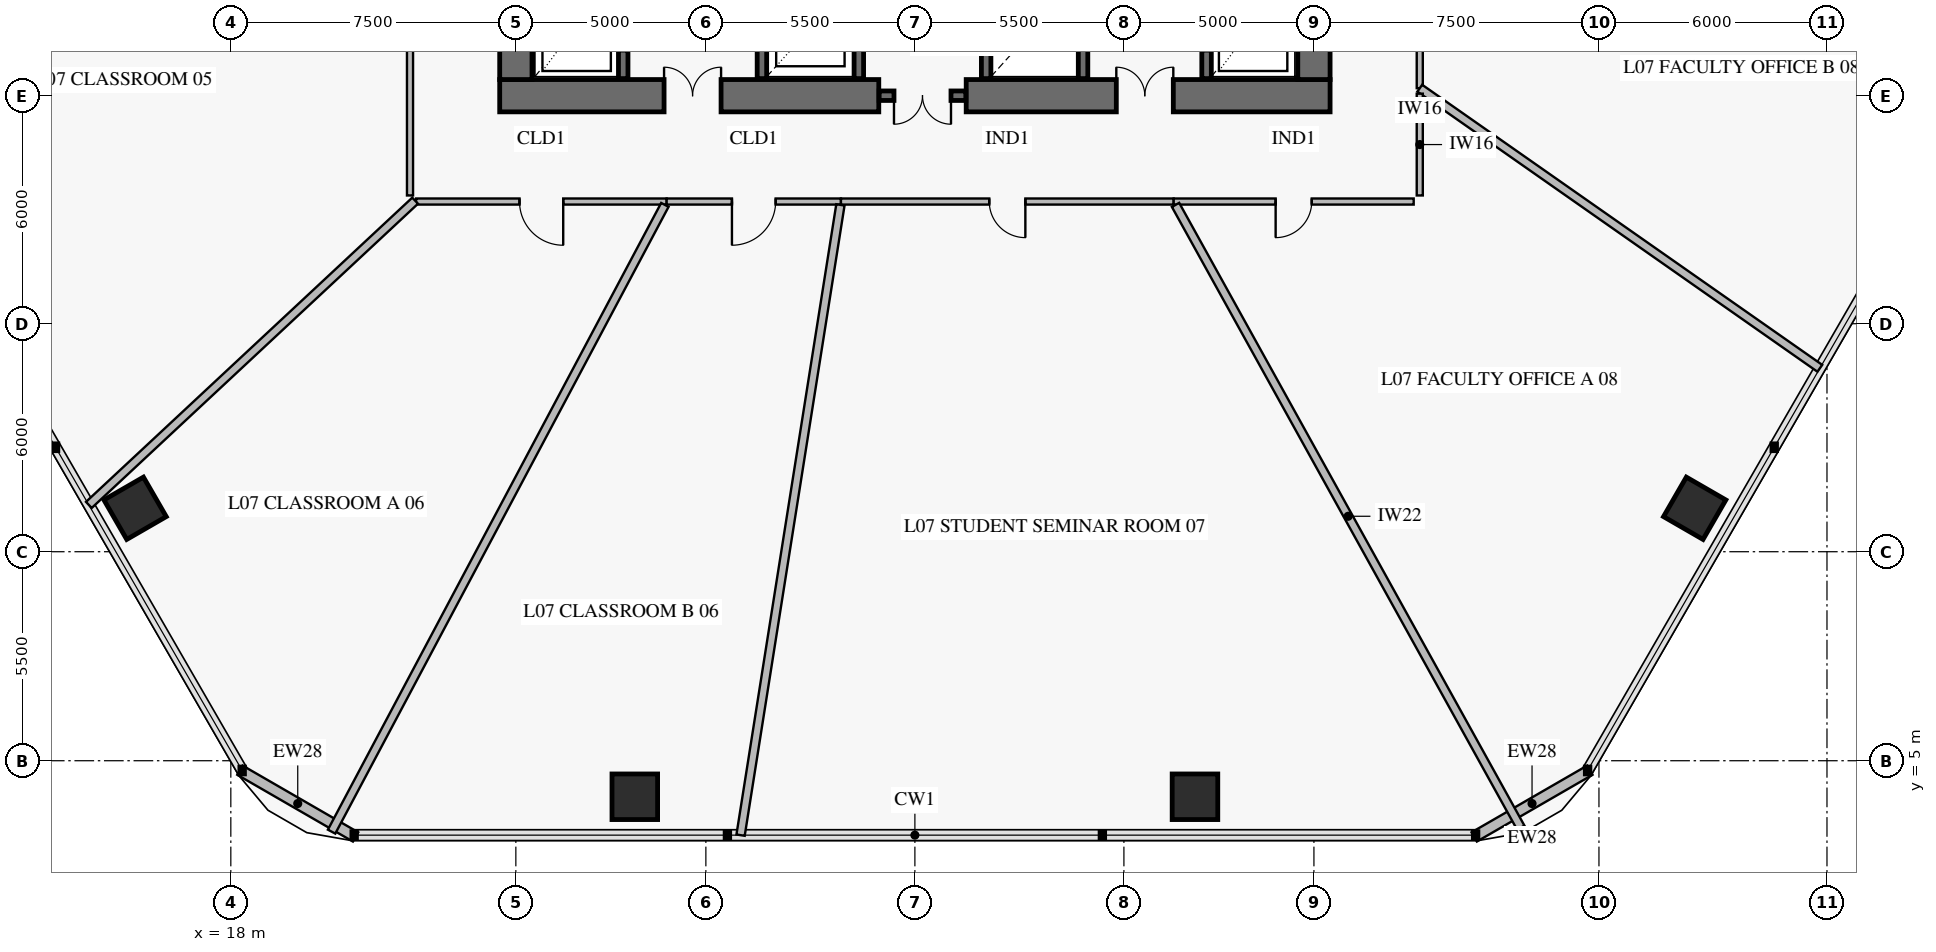
"""IFC4 building model, lengths in metres.
Left out: names, types, materials, properties, quantities, classifications, styles, units other than length and angle.
Written with IfcOpenShell. Run it as: python <this file> out.ifc"""

import sys

from ifc_helpers import new_model, si_unit, direction, frame, frame_2d, origin, origin_2d, place, context, subcontext, project, spatial, rectangle, extrude, element, fill, save


model = new_model("IFC4")
c1 = context("Model", 3, precision=1e-05, world=origin(), true_north=direction((0.0, 1.0)))
c2 = subcontext(c1, "Body", "Model", "MODEL_VIEW")
j1 = project(units=[si_unit("LENGTHUNIT", "METRE"), si_unit("PLANEANGLEUNIT", "RADIAN")], contexts=[c1])
p1 = place(None, origin())
s1 = spatial("IfcSite", under=j1, at=p1, CompositionType="ELEMENT")
p2 = place(p1, origin())
s2 = spatial("IfcBuilding", under=s1, at=p2, CompositionType="ELEMENT")
p3 = place(p2, frame((0.0, 0.0, 28.8)))
s3 = spatial("IfcBuildingStorey", under=s2, at=p3, CompositionType="ELEMENT", Elevation=28.8)
p4 = place(p3, frame((25.075, 22.5, 0.0), z_axis=(0.0, 0.0, 1.0), x_axis=(1.0, 0.0, 0.0)))
e1 = element("IfcWall", 1, at=p4, inside=s3, PredefinedType="SHEAR", context=c2, shape_type="SweptSolid", body=[
    extrude(rectangle(XDim=9.975, YDim=0.85, at=frame_2d((4.988, 0.0))), origin(), (0.0, 0.0, 1.0), 4.2),
])
p5 = place(p4, frame((4.325, 0.0, 0.0)))
e2 = element("IfcOpeningElement", 2, at=p5, cuts=e1, PredefinedType="OPENING", context=c2, shape_type="SweptSolid", body=[
    extrude(rectangle(XDim=1.5, YDim=2.15, at=frame_2d((0.75, 1.075))), frame((0.0, 0.437, 0.0), z_axis=(0.0, -1.0, 0.0), x_axis=(1.0, 0.0, 0.0)), (0.0, 0.0, 1.0), 0.874),
])
p6 = place(p3, frame((37.35, 22.5, 0.0), z_axis=(0.0, 0.0, 1.0), x_axis=(1.0, 0.0, 0.0)))
e3 = element("IfcWall", 3, at=p6, inside=s3, PredefinedType="SHEAR", context=c2, shape_type="SweptSolid", body=[
    extrude(rectangle(XDim=9.575, YDim=0.85, at=frame_2d((4.788, 0.0))), origin(), (0.0, 0.0, 1.0), 4.2),
])
p7 = place(p6, frame((3.95, 0.0, 0.0)))
e4 = element("IfcOpeningElement", 4, at=p7, cuts=e3, PredefinedType="OPENING", context=c2, shape_type="SweptSolid", body=[
    extrude(rectangle(XDim=1.5, YDim=2.15, at=frame_2d((0.75, 1.075))), frame((0.0, 0.437, 0.0), z_axis=(0.0, -1.0, 0.0), x_axis=(1.0, 0.0, 0.0)), (0.0, 0.0, 1.0), 0.874),
])
p8 = place(p3, frame((25.5, 22.925, 0.0), z_axis=(0.0, 0.0, 1.0), x_axis=(0.0, 1.0, 0.0)))
e5 = element("IfcWall", 5, at=p8, inside=s3, PredefinedType="SHEAR", context=c2, shape_type="SweptSolid", body=[
    extrude(rectangle(XDim=18.15, YDim=0.85, at=frame_2d((9.075, 0.0))), origin(), (0.0, 0.0, 1.0), 4.2),
])
p9 = place(p8, frame((8.825, 0.0, 0.0)))
e6 = element("IfcOpeningElement", 6, at=p9, cuts=e5, PredefinedType="OPENING", context=c2, shape_type="SweptSolid", body=[
    extrude(rectangle(XDim=1.1, YDim=2.15, at=frame_2d((0.55, 1.075))), frame((0.0, 0.437, 0.0), z_axis=(0.0, -1.0, 0.0), x_axis=(1.0, 0.0, 0.0)), (0.0, 0.0, 1.0), 0.874),
])
p10 = place(p3, frame((46.5, 22.925, 0.0), z_axis=(0.0, 0.0, 1.0), x_axis=(0.0, 1.0, 0.0)))
e7 = element("IfcWall", 7, at=p10, inside=s3, PredefinedType="SHEAR", context=c2, shape_type="SweptSolid", body=[
    extrude(rectangle(XDim=18.15, YDim=0.85, at=frame_2d((9.075, 0.0))), origin(), (0.0, 0.0, 1.0), 4.2),
])
p11 = place(p10, frame((8.825, 0.0, 0.0)))
e8 = element("IfcOpeningElement", 8, at=p11, cuts=e7, PredefinedType="OPENING", context=c2, shape_type="SweptSolid", body=[
    extrude(rectangle(XDim=1.1, YDim=2.15, at=frame_2d((0.55, 1.075))), frame((0.0, 0.437, 0.0), z_axis=(0.0, -1.0, 0.0), x_axis=(1.0, 0.0, 0.0)), (0.0, 0.0, 1.0), 0.874),
])
for number, where, z_axis, x_axis in (
    (9, (15.481, 11.643, 0.0), (0.0, 0.0, 1.0), (0.5, -0.866, 0.0)),
    (10, (28.63, 4.052, 0.0), (0.0, 0.0, 1.0), (1.0, 0.0, 0.0)),
    (11, (43.37, 4.052, 0.0), (0.0, 0.0, 1.0), (1.0, 0.0, 0.0)),
    (12, (56.519, 11.643, 0.0), (0.0, 0.0, 1.0), (0.5, 0.866, 0.0)),
):
    element("IfcColumn", number, at=place(p3, frame(where, z_axis=z_axis, x_axis=x_axis)), inside=s3, PredefinedType="COLUMN", context=c2, shape_type="SweptSolid", body=[
        extrude(rectangle(XDim=1.2, YDim=1.2, at=origin_2d()), origin(), (0.0, 0.0, 1.0), 3.92),
    ])
for number, where, z_axis, x_axis in (
    (13, (53.761, 4.751, 0.0), (0.0, 0.0, 1.0), (-0.866, -0.5, 0.0)),
    (14, (21.283, 2.994, 0.0), (0.0, 0.0, 1.0), (-0.866, 0.5, 0.0)),
):
    element("IfcWall", number, at=place(p3, frame(where, z_axis=z_axis, x_axis=x_axis)), inside=s3, PredefinedType="SOLIDWALL", context=c2, shape_type="SweptSolid", body=[
        extrude(rectangle(XDim=3.515, YDim=0.28, at=frame_2d((1.757, 0.0))), origin(), (0.0, 0.0, 1.0), 3.92),
    ])
p12 = place(p3, frame((35.06, 22.5, 0.0), z_axis=(0.0, 0.0, 1.0), x_axis=(1.0, 0.0, 0.0)))
e15 = element("IfcWall", 15, at=p12, inside=s3, PredefinedType="SOLIDWALL", context=c2, shape_type="SweptSolid", body=[
    extrude(rectangle(XDim=2.28, YDim=0.25, at=frame_2d((1.14, 0.0))), origin(), (0.0, 0.0, 1.0), 4.2),
])
p13 = place(p12, frame((0.39, 0.0, 0.0)))
e16 = element("IfcOpeningElement", 16, at=p13, cuts=e15, PredefinedType="OPENING", context=c2, shape_type="SweptSolid", body=[
    extrude(rectangle(XDim=1.5, YDim=2.15, at=frame_2d((0.75, 1.075))), frame((0.0, 0.137, 0.0), z_axis=(0.0, -1.0, 0.0), x_axis=(1.0, 0.0, 0.0)), (0.0, 0.0, 1.0), 0.274),
])
p14 = place(p3, frame((28.325, 22.95, 0.0), z_axis=(0.0, 0.0, 1.0), x_axis=(0.0, 1.0, 0.0)))
e17 = element("IfcWall", 17, at=p14, inside=s3, PredefinedType="SOLIDWALL", context=c2, shape_type="SweptSolid", body=[
    extrude(rectangle(XDim=8.2, YDim=0.25, at=frame_2d((4.1, 0.0))), origin(), (0.0, 0.0, 1.0), 4.2),
])
p15 = place(p14, frame((0.75, 0.0, 0.0)))
e18 = element("IfcOpeningElement", 18, at=p15, cuts=e17, PredefinedType="OPENING", context=c2, shape_type="SweptSolid", body=[
    extrude(rectangle(XDim=1.3, YDim=2.3, at=frame_2d((0.65, 1.15))), frame((0.0, 0.137, 0.0), z_axis=(0.0, -1.0, 0.0), x_axis=(1.0, 0.0, 0.0)), (0.0, 0.0, 1.0), 0.274),
])
p16 = place(p14, frame((3.78, 0.0, 0.0)))
e19 = element("IfcOpeningElement", 19, at=p16, cuts=e17, PredefinedType="OPENING", context=c2, shape_type="SweptSolid", body=[
    extrude(rectangle(XDim=0.9, YDim=2.1, at=frame_2d((0.45, 1.05))), frame((0.0, 0.137, 0.0), z_axis=(0.0, -1.0, 0.0), x_axis=(1.0, 0.0, 0.0)), (0.0, 0.0, 1.0), 0.274),
])
p17 = place(p14, frame((6.5, 0.0, 0.0)))
e20 = element("IfcOpeningElement", 20, at=p17, cuts=e17, PredefinedType="OPENING", context=c2, shape_type="SweptSolid", body=[
    extrude(rectangle(XDim=0.9, YDim=2.1, at=frame_2d((0.45, 1.05))), frame((0.0, 0.137, 0.0), z_axis=(0.0, -1.0, 0.0), x_axis=(1.0, 0.0, 0.0)), (0.0, 0.0, 1.0), 0.274),
])
p18 = place(p3, frame((31.975, 22.95, 0.0), z_axis=(0.0, 0.0, 1.0), x_axis=(0.0, 1.0, 0.0)))
e21 = element("IfcWall", 21, at=p18, inside=s3, PredefinedType="SOLIDWALL", context=c2, shape_type="SweptSolid", body=[
    extrude(rectangle(XDim=8.2, YDim=0.25, at=frame_2d((4.1, 0.0))), origin(), (0.0, 0.0, 1.0), 4.2),
])
p19 = place(p3, frame((34.525, 22.95, 0.0), z_axis=(0.0, 0.0, 1.0), x_axis=(0.0, 1.0, 0.0)))
e22 = element("IfcWall", 22, at=p19, inside=s3, PredefinedType="SOLIDWALL", context=c2, shape_type="SweptSolid", body=[
    extrude(rectangle(XDim=8.2, YDim=0.25, at=frame_2d((4.1, 0.0))), origin(), (0.0, 0.0, 1.0), 4.2),
])
p20 = place(p19, frame((0.775, 0.0, 0.0)))
e23 = element("IfcOpeningElement", 23, at=p20, cuts=e22, PredefinedType="OPENING", context=c2, shape_type="SweptSolid", body=[
    extrude(rectangle(XDim=1.1, YDim=2.2, at=frame_2d((0.55, 1.1))), frame((0.0, 0.137, 0.0), z_axis=(0.0, -1.0, 0.0), x_axis=(1.0, 0.0, 0.0)), (0.0, 0.0, 1.0), 0.274),
])
p21 = place(p19, frame((3.575, 0.0, 0.0)))
e24 = element("IfcOpeningElement", 24, at=p21, cuts=e22, PredefinedType="OPENING", context=c2, shape_type="SweptSolid", body=[
    extrude(rectangle(XDim=1.1, YDim=2.2, at=frame_2d((0.55, 1.1))), frame((0.0, 0.137, 0.0), z_axis=(0.0, -1.0, 0.0), x_axis=(1.0, 0.0, 0.0)), (0.0, 0.0, 1.0), 0.274),
])
p22 = place(p19, frame((6.375, 0.0, 0.0)))
e25 = element("IfcOpeningElement", 25, at=p22, cuts=e22, PredefinedType="OPENING", context=c2, shape_type="SweptSolid", body=[
    extrude(rectangle(XDim=1.1, YDim=2.2, at=frame_2d((0.55, 1.1))), frame((0.0, 0.137, 0.0), z_axis=(0.0, -1.0, 0.0), x_axis=(1.0, 0.0, 0.0)), (0.0, 0.0, 1.0), 0.274),
])
for number, where, z_axis, x_axis in (
    (26, (37.875, 22.95, 0.0), (0.0, 0.0, 1.0), (0.0, 1.0, 0.0)),
    (27, (40.425, 22.95, 0.0), (0.0, 0.0, 1.0), (0.0, 1.0, 0.0)),
):
    element("IfcWall", number, at=place(p3, frame(where, z_axis=z_axis, x_axis=x_axis)), inside=s3, PredefinedType="SOLIDWALL", context=c2, shape_type="SweptSolid", body=[
        extrude(rectangle(XDim=8.2, YDim=0.25, at=frame_2d((4.1, 0.0))), origin(), (0.0, 0.0, 1.0), 4.2),
    ])
p23 = place(p3, frame((43.675, 22.95, 0.0), z_axis=(0.0, 0.0, 1.0), x_axis=(0.0, 1.0, 0.0)))
e28 = element("IfcWall", 28, at=p23, inside=s3, PredefinedType="SOLIDWALL", context=c2, shape_type="SweptSolid", body=[
    extrude(rectangle(XDim=8.2, YDim=0.25, at=frame_2d((4.1, 0.0))), origin(), (0.0, 0.0, 1.0), 4.2),
])
p24 = place(p23, frame((0.75, 0.0, 0.0)))
e29 = element("IfcOpeningElement", 29, at=p24, cuts=e28, PredefinedType="OPENING", context=c2, shape_type="SweptSolid", body=[
    extrude(rectangle(XDim=1.3, YDim=2.3, at=frame_2d((0.65, 1.15))), frame((0.0, 0.137, 0.0), z_axis=(0.0, -1.0, 0.0), x_axis=(1.0, 0.0, 0.0)), (0.0, 0.0, 1.0), 0.274),
])
p25 = place(p23, frame((3.7, 0.0, 0.0)))
e30 = element("IfcOpeningElement", 30, at=p25, cuts=e28, PredefinedType="OPENING", context=c2, shape_type="SweptSolid", body=[
    extrude(rectangle(XDim=1.3, YDim=2.3, at=frame_2d((0.65, 1.15))), frame((0.0, 0.137, 0.0), z_axis=(0.0, -1.0, 0.0), x_axis=(1.0, 0.0, 0.0)), (0.0, 0.0, 1.0), 0.274),
])
p26 = place(p23, frame((6.62, 0.0, 0.0)))
e31 = element("IfcOpeningElement", 31, at=p26, cuts=e28, PredefinedType="OPENING", context=c2, shape_type="SweptSolid", body=[
    extrude(rectangle(XDim=0.9, YDim=2.1, at=frame_2d((0.45, 1.05))), frame((0.0, 0.137, 0.0), z_axis=(0.0, -1.0, 0.0), x_axis=(1.0, 0.0, 0.0)), (0.0, 0.0, 1.0), 0.274),
])
p27 = place(p3, frame((22.715, 31.304, 0.0), z_axis=(0.0, 0.0, 1.0), x_axis=(0.0, -1.0, 0.0)))
e32 = element("IfcWall", 32, at=p27, inside=s3, PredefinedType="PARTITIONING", context=c2, shape_type="SweptSolid", body=[
    extrude(rectangle(XDim=11.429, YDim=0.16, at=frame_2d((5.714, 0.0))), origin(), (0.0, 0.0, 1.0), 3.22),
])
p28 = place(p27, frame((5.139, 0.0, 0.0)))
e33 = element("IfcOpeningElement", 33, at=p28, cuts=e32, PredefinedType="OPENING", context=c2, shape_type="SweptSolid", body=[
    extrude(rectangle(XDim=1.15, YDim=2.2, at=frame_2d((0.575, 1.1))), frame((0.0, 0.092, 0.0), z_axis=(0.0, -1.0, 0.0), x_axis=(1.0, 0.0, 0.0)), (0.0, 0.0, 1.0), 0.184),
])
p29 = place(p3, frame((22.875, 19.715, 0.0), z_axis=(0.0, 0.0, 1.0), x_axis=(1.0, 0.0, 0.0)))
e34 = element("IfcWall", 34, at=p29, inside=s3, PredefinedType="PARTITIONING", context=c2, shape_type="SweptSolid", body=[
    extrude(rectangle(XDim=6.593, YDim=0.16, at=frame_2d((3.296, 0.0))), origin(), (0.0, 0.0, 1.0), 3.22),
])
p30 = place(p29, frame((2.721, 0.0, 0.0)))
e35 = element("IfcOpeningElement", 35, at=p30, cuts=e34, PredefinedType="OPENING", context=c2, shape_type="SweptSolid", body=[
    extrude(rectangle(XDim=1.15, YDim=2.2, at=frame_2d((0.575, 1.1))), frame((0.0, 0.092, 0.0), z_axis=(0.0, -1.0, 0.0), x_axis=(1.0, 0.0, 0.0)), (0.0, 0.0, 1.0), 0.184),
])
p31 = place(p3, frame((29.468, 19.715, 0.0), z_axis=(0.0, 0.0, 1.0), x_axis=(1.0, 0.0, 0.0)))
e36 = element("IfcWall", 36, at=p31, inside=s3, PredefinedType="PARTITIONING", context=c2, shape_type="SweptSolid", body=[
    extrude(rectangle(XDim=4.586, YDim=0.16, at=frame_2d((2.293, 0.0))), origin(), (0.0, 0.0, 1.0), 3.22),
])
p32 = place(p31, frame((1.718, 0.0, 0.0)))
e37 = element("IfcOpeningElement", 37, at=p32, cuts=e36, PredefinedType="OPENING", context=c2, shape_type="SweptSolid", body=[
    extrude(rectangle(XDim=1.15, YDim=2.2, at=frame_2d((0.575, 1.1))), frame((0.0, 0.092, 0.0), z_axis=(0.0, -1.0, 0.0), x_axis=(1.0, 0.0, 0.0)), (0.0, 0.0, 1.0), 0.184),
])
p33 = place(p3, frame((34.054, 19.715, 0.0), z_axis=(0.0, 0.0, 1.0), x_axis=(1.0, 0.0, 0.0)))
e38 = element("IfcWall", 38, at=p33, inside=s3, PredefinedType="PARTITIONING", context=c2, shape_type="SweptSolid", body=[
    extrude(rectangle(XDim=8.756, YDim=0.16, at=frame_2d((4.378, 0.0))), origin(), (0.0, 0.0, 1.0), 3.22),
])
p34 = place(p33, frame((3.903, 0.0, 0.0)))
e39 = element("IfcOpeningElement", 39, at=p34, cuts=e38, PredefinedType="OPENING", context=c2, shape_type="SweptSolid", body=[
    extrude(rectangle(XDim=0.95, YDim=2.1, at=frame_2d((0.475, 1.05))), frame((0.0, 0.092, 0.0), z_axis=(0.0, -1.0, 0.0), x_axis=(1.0, 0.0, 0.0)), (0.0, 0.0, 1.0), 0.184),
])
p35 = place(p3, frame((42.81, 19.715, 0.0), z_axis=(0.0, 0.0, 1.0), x_axis=(1.0, 0.0, 0.0)))
e40 = element("IfcWall", 40, at=p35, inside=s3, PredefinedType="PARTITIONING", context=c2, shape_type="SweptSolid", body=[
    extrude(rectangle(XDim=6.315, YDim=0.16, at=frame_2d((3.158, 0.0))), origin(), (0.0, 0.0, 1.0), 3.22),
])
p36 = place(p35, frame((2.683, 0.0, 0.0)))
e41 = element("IfcOpeningElement", 41, at=p36, cuts=e40, PredefinedType="OPENING", context=c2, shape_type="SweptSolid", body=[
    extrude(rectangle(XDim=0.95, YDim=2.1, at=frame_2d((0.475, 1.05))), frame((0.0, 0.092, 0.0), z_axis=(0.0, -1.0, 0.0), x_axis=(1.0, 0.0, 0.0)), (0.0, 0.0, 1.0), 0.184),
])
p37 = place(p3, frame((49.285, 22.698, 0.0), z_axis=(0.0, 0.0, 1.0), x_axis=(0.0, 1.0, 0.0)))
e42 = element("IfcWall", 42, at=p37, inside=s3, PredefinedType="PARTITIONING", context=c2, shape_type="SweptSolid", body=[
    extrude(rectangle(XDim=7.198, YDim=0.16, at=frame_2d((3.599, 0.0))), origin(), (0.0, 0.0, 1.0), 3.22),
])
p38 = place(p37, frame((3.124, 0.0, 0.0)))
e43 = element("IfcOpeningElement", 43, at=p38, cuts=e42, PredefinedType="OPENING", context=c2, shape_type="SweptSolid", body=[
    extrude(rectangle(XDim=0.95, YDim=2.1, at=frame_2d((0.475, 1.05))), frame((0.0, 0.092, 0.0), z_axis=(0.0, -1.0, 0.0), x_axis=(1.0, 0.0, 0.0)), (0.0, 0.0, 1.0), 0.184),
])
p39 = place(p3, frame((22.85, 19.737, 0.0), z_axis=(0.0, 0.0, 1.0), x_axis=(-0.731360864489, -0.681990678744, 0.0)))
e44 = element("IfcWall", 44, at=p39, inside=s3, PredefinedType="PARTITIONING", context=c2, shape_type="SweptSolid", body=[
    extrude(rectangle(XDim=11.74, YDim=0.22, at=frame_2d((5.87, 0.0))), origin(), (0.0, 0.0, 1.0), 3.17),
])
p40 = place(p3, frame((29.421, 19.627, 0.0), z_axis=(0.0, 0.0, 1.0), x_axis=(-0.469469908408, -0.882948472505, 0.0)))
e45 = element("IfcWall", 45, at=p40, inside=s3, PredefinedType="PARTITIONING", context=c2, shape_type="SweptSolid", body=[
    extrude(rectangle(XDim=18.68, YDim=0.22, at=frame_2d((9.34, 0.0))), origin(), (0.0, 0.0, 1.0), 3.17),
])
p41 = place(p3, frame((34.04, 19.627, 0.0), z_axis=(0.0, 0.0, 1.0), x_axis=(-0.156438882107, -0.98768764099, 0.0)))
e46 = element("IfcWall", 46, at=p41, inside=s3, PredefinedType="PARTITIONING", context=c2, shape_type="SweptSolid", body=[
    extrude(rectangle(XDim=16.792, YDim=0.22, at=frame_2d((8.396, 0.0))), origin(), (0.0, 0.0, 1.0), 3.17),
])
p42 = place(p3, frame((42.858, 19.627, 0.0), z_axis=(0.0, 0.0, 1.0), x_axis=(0.484814111505, -0.874617217579, 0.0)))
e47 = element("IfcWall", 47, at=p42, inside=s3, PredefinedType="PARTITIONING", context=c2, shape_type="SweptSolid", body=[
    extrude(rectangle(XDim=18.738, YDim=0.22, at=frame_2d((9.369, 0.0))), origin(), (0.0, 0.0, 1.0), 3.17),
])
p43 = place(p3, frame((49.285, 22.698, 0.0), z_axis=(0.0, 0.0, 1.0), x_axis=(0.819154265409, -0.57357326425, 0.0)))
e48 = element("IfcWall", 48, at=p43, inside=s3, PredefinedType="PARTITIONING", context=c2, shape_type="SweptSolid", body=[
    extrude(rectangle(XDim=12.851, YDim=0.22, at=frame_2d((6.426, 0.0))), origin(), (0.0, 0.0, 1.0), 3.17),
])
p44 = place(p3, frame((49.285, 19.875, 0.0), z_axis=(0.0, 0.0, 1.0), x_axis=(0.0, 1.0, 0.0)))
e49 = element("IfcWall", 49, at=p44, inside=s3, PredefinedType="PARTITIONING", context=c2, shape_type="SweptSolid", body=[
    extrude(rectangle(XDim=2.679, YDim=0.16, at=frame_2d((1.339, 0.0))), origin(), (0.0, 0.0, 1.0), 3.92),
])
p45 = place(p5, origin())
e50 = element("IfcDoor", 50, at=p45, inside=s3, OperationType="DOUBLE_DOOR_SINGLE_SWING", PredefinedType="DOOR", context=c2, shape_type="SweptSolid", body=[
    extrude(rectangle(XDim=1.5, YDim=2.15, at=frame_2d((0.75, 1.075))), frame((0.0, 0.025, 0.0), z_axis=(0.0, -1.0, 0.0), x_axis=(1.0, 0.0, 0.0)), (0.0, 0.0, 1.0), 0.05),
])
fill(e2, e50)
p46 = place(p7, origin())
e51 = element("IfcDoor", 51, at=p46, inside=s3, OperationType="DOUBLE_DOOR_SINGLE_SWING", PredefinedType="DOOR", context=c2, shape_type="SweptSolid", body=[
    extrude(rectangle(XDim=1.5, YDim=2.15, at=frame_2d((0.75, 1.075))), frame((0.0, 0.025, 0.0), z_axis=(0.0, -1.0, 0.0), x_axis=(1.0, 0.0, 0.0)), (0.0, 0.0, 1.0), 0.05),
])
fill(e4, e51)
p47 = place(p13, frame((1.5, 0.0, 0.0), z_axis=(0.0, 0.0, 1.0), x_axis=(-1.0, 0.0, 0.0)))
e52 = element("IfcDoor", 52, at=p47, inside=s3, OperationType="DOUBLE_DOOR_SINGLE_SWING", PredefinedType="DOOR", context=c2, shape_type="SweptSolid", body=[
    extrude(rectangle(XDim=1.5, YDim=2.15, at=frame_2d((0.75, 1.075))), frame((0.0, 0.025, 0.0), z_axis=(0.0, -1.0, 0.0), x_axis=(1.0, 0.0, 0.0)), (0.0, 0.0, 1.0), 0.05),
])
fill(e16, e52)
p48 = place(p30, frame((1.15, 0.0, 0.0), z_axis=(0.0, 0.0, 1.0), x_axis=(-1.0, 0.0, 0.0)))
e53 = element("IfcDoor", 53, at=p48, inside=s3, OperationType="SINGLE_SWING_LEFT", PredefinedType="DOOR", context=c2, shape_type="SweptSolid", body=[
    extrude(rectangle(XDim=1.15, YDim=2.2, at=frame_2d((0.575, 1.1))), frame((0.0, 0.025, 0.0), z_axis=(0.0, -1.0, 0.0), x_axis=(1.0, 0.0, 0.0)), (0.0, 0.0, 1.0), 0.05),
])
fill(e35, e53)
p49 = place(p32, frame((1.15, 0.0, 0.0), z_axis=(0.0, 0.0, 1.0), x_axis=(-1.0, 0.0, 0.0)))
e54 = element("IfcDoor", 54, at=p49, inside=s3, OperationType="SINGLE_SWING_RIGHT", PredefinedType="DOOR", context=c2, shape_type="SweptSolid", body=[
    extrude(rectangle(XDim=1.15, YDim=2.2, at=frame_2d((0.575, 1.1))), frame((0.0, 0.025, 0.0), z_axis=(0.0, -1.0, 0.0), x_axis=(1.0, 0.0, 0.0)), (0.0, 0.0, 1.0), 0.05),
])
fill(e37, e54)
p50 = place(p34, frame((0.95, 0.0, 0.0), z_axis=(0.0, 0.0, 1.0), x_axis=(-1.0, 0.0, 0.0)))
e55 = element("IfcDoor", 55, at=p50, inside=s3, OperationType="SINGLE_SWING_LEFT", PredefinedType="DOOR", context=c2, shape_type="SweptSolid", body=[
    extrude(rectangle(XDim=0.95, YDim=2.1, at=frame_2d((0.475, 1.05))), frame((0.0, 0.025, 0.0), z_axis=(0.0, -1.0, 0.0), x_axis=(1.0, 0.0, 0.0)), (0.0, 0.0, 1.0), 0.05),
])
fill(e39, e55)
p51 = place(p36, frame((0.95, 0.0, 0.0), z_axis=(0.0, 0.0, 1.0), x_axis=(-1.0, 0.0, 0.0)))
e56 = element("IfcDoor", 56, at=p51, inside=s3, OperationType="SINGLE_SWING_RIGHT", PredefinedType="DOOR", context=c2, shape_type="SweptSolid", body=[
    extrude(rectangle(XDim=0.95, YDim=2.1, at=frame_2d((0.475, 1.05))), frame((0.0, 0.025, 0.0), z_axis=(0.0, -1.0, 0.0), x_axis=(1.0, 0.0, 0.0)), (0.0, 0.0, 1.0), 0.05),
])
fill(e41, e56)
save(model, sys.argv[1])
